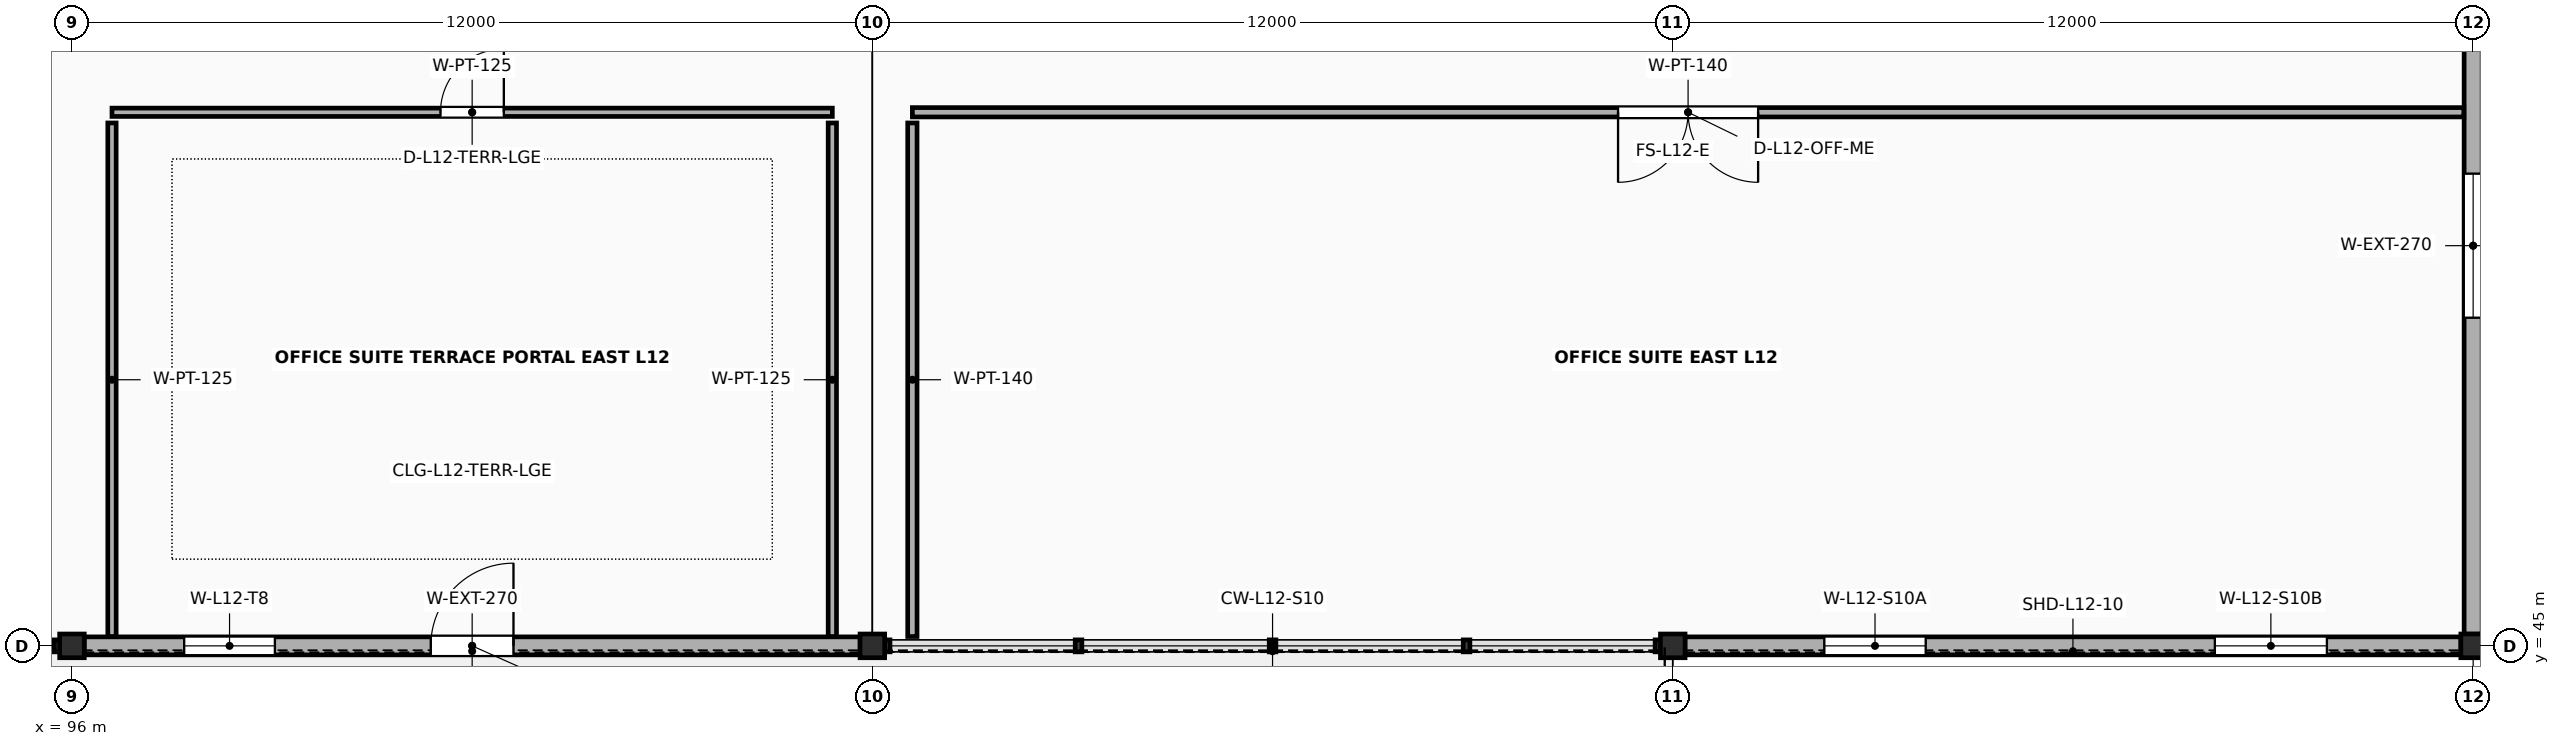
"""IFC4 building model, lengths in metres.
Left out: names, types, materials, properties, quantities, classifications, styles, units other than length and angle.
Written with IfcOpenShell. Run it as: python <this file> out.ifc"""

import sys

from ifc_helpers import new_model, si_unit, direction, frame, frame_2d, origin, origin_2d, place, context, subcontext, project, spatial, rectangle, i_section, extrude, element, fill, save


model = new_model("IFC4")
c1 = context("Model", 3, precision=1e-05, world=origin(), true_north=direction((0.0, 1.0)))
c2 = subcontext(c1, "Body", "Model", "MODEL_VIEW")
j1 = project(units=[si_unit("LENGTHUNIT", "METRE"), si_unit("PLANEANGLEUNIT", "RADIAN")], contexts=[c1])
p1 = place(None, origin())
s1 = spatial("IfcSite", under=j1, at=p1, CompositionType="ELEMENT")
p2 = place(p1, origin())
s2 = spatial("IfcBuilding", under=s1, at=p2, CompositionType="ELEMENT")
p3 = place(p2, frame((0.0, 0.0, 49.6)))
s3 = spatial("IfcBuildingStorey", under=s2, at=p3, CompositionType="ELEMENT", Elevation=49.6)
for number, where, z_axis, x_axis in (
    (1, (96.0, 45.0, 0.0), (0.0, 0.0, 1.0), (1.0, 0.0, 0.0)),
    (2, (108.0, 45.0, 0.0), (0.0, 0.0, 1.0), (1.0, 0.0, 0.0)),
    (3, (120.0, 45.0, 0.0), (0.0, 0.0, 1.0), (1.0, 0.0, 0.0)),
    (4, (132.0, 45.0, 0.0), (0.0, 0.0, 1.0), (1.0, 0.0, 0.0)),
):
    element("IfcColumn", number, at=place(p3, frame(where, z_axis=z_axis, x_axis=x_axis)), inside=s3, PredefinedType="COLUMN", context=c2, shape_type="SweptSolid", body=[
        extrude(i_section(OverallWidth=0.369, OverallDepth=0.356, WebThickness=0.011, FlangeThickness=0.018, FilletRadius=0.018, at=origin_2d()), origin(), (0.0, 0.0, 1.0), 4.0),
    ])
p4 = place(p3, frame((96.183, 45.0, 0.0), z_axis=(0.0, 0.0, 1.0), x_axis=(1.0, 0.0, 0.0)))
e5 = element("IfcWall", 5, at=p4, inside=s3, PredefinedType="SOLIDWALL", context=c2, shape_type="SweptSolid", body=[
    extrude(rectangle(XDim=11.635, YDim=0.27, at=frame_2d((5.817, 0.0))), origin(), (0.0, 0.0, 1.0), 3.301),
])
p5 = place(p4, frame((5.197, 0.0, 0.0)))
e6 = element("IfcOpeningElement", 6, at=p5, cuts=e5, PredefinedType="OPENING", context=c2, shape_type="SweptSolid", body=[
    extrude(rectangle(XDim=1.24, YDim=2.24, at=frame_2d((0.62, 1.12))), frame((0.0, 0.15, 0.0), z_axis=(0.0, -1.0, 0.0), x_axis=(1.0, 0.0, 0.0)), (0.0, 0.0, 1.0), 0.3),
])
p6 = place(p4, frame((1.5, 0.0, 0.85)))
e7 = element("IfcOpeningElement", 7, at=p6, cuts=e5, PredefinedType="OPENING", context=c2, shape_type="SweptSolid", body=[
    extrude(rectangle(XDim=1.36, YDim=1.42, at=frame_2d((0.68, 0.71))), frame((0.0, 0.15, 0.0), z_axis=(0.0, -1.0, 0.0), x_axis=(1.0, 0.0, 0.0)), (0.0, 0.0, 1.0), 0.3),
])
p7 = place(p3, frame((120.183, 45.0, 0.0), z_axis=(0.0, 0.0, 1.0), x_axis=(1.0, 0.0, 0.0)))
e8 = element("IfcWall", 8, at=p7, inside=s3, PredefinedType="SOLIDWALL", context=c2, shape_type="SweptSolid", body=[
    extrude(rectangle(XDim=11.635, YDim=0.27, at=frame_2d((5.817, 0.0))), origin(), (0.0, 0.0, 1.0), 3.301),
])
p8 = place(p7, frame((2.09, 0.0, 0.78)))
e9 = element("IfcOpeningElement", 9, at=p8, cuts=e8, PredefinedType="OPENING", context=c2, shape_type="SweptSolid", body=[
    extrude(rectangle(XDim=1.52, YDim=1.42, at=frame_2d((0.76, 0.71))), frame((0.0, 0.15, 0.0), z_axis=(0.0, -1.0, 0.0), x_axis=(1.0, 0.0, 0.0)), (0.0, 0.0, 1.0), 0.3),
])
p9 = place(p7, frame((7.945, 0.0, 0.78)))
e10 = element("IfcOpeningElement", 10, at=p9, cuts=e8, PredefinedType="OPENING", context=c2, shape_type="SweptSolid", body=[
    extrude(rectangle(XDim=1.68, YDim=1.42, at=frame_2d((0.84, 0.71))), frame((0.0, 0.15, 0.0), z_axis=(0.0, -1.0, 0.0), x_axis=(1.0, 0.0, 0.0)), (0.0, 0.0, 1.0), 0.3),
])
p10 = place(p3, frame((132.0, 45.176, 0.0), z_axis=(0.0, 0.0, 1.0), x_axis=(0.0, 1.0, 0.0)))
e11 = element("IfcWall", 11, at=p10, inside=s3, PredefinedType="SOLIDWALL", context=c2, shape_type="SweptSolid", body=[
    extrude(rectangle(XDim=11.648, YDim=0.27, at=frame_2d((5.824, 0.0))), origin(), (0.0, 0.0, 1.0), 3.301),
])
p11 = place(p10, frame((4.744, 0.0, 0.78)))
e12 = element("IfcOpeningElement", 12, at=p11, cuts=e11, PredefinedType="OPENING", context=c2, shape_type="SweptSolid", body=[
    extrude(rectangle(XDim=2.16, YDim=1.42, at=frame_2d((1.08, 0.71))), frame((0.0, 0.15, 0.0), z_axis=(0.0, -1.0, 0.0), x_axis=(1.0, 0.0, 0.0)), (0.0, 0.0, 1.0), 0.3),
])
p12 = place(p3, frame((96.6, 53.0, 0.0), z_axis=(0.0, 0.0, 1.0), x_axis=(1.0, 0.0, 0.0)))
e13 = element("IfcWall", 13, at=p12, inside=s3, PredefinedType="PARTITIONING", context=c2, shape_type="SweptSolid", body=[
    extrude(rectangle(XDim=10.8, YDim=0.125, at=frame_2d((5.4, 0.0))), origin(), (0.0, 0.0, 1.0), 2.88),
])
p13 = place(p12, frame((4.925, 0.0, 0.0)))
e14 = element("IfcOpeningElement", 14, at=p13, cuts=e13, PredefinedType="OPENING", context=c2, shape_type="SweptSolid", body=[
    extrude(rectangle(XDim=0.95, YDim=2.13, at=frame_2d((0.475, 1.065))), frame((0.0, 0.077, 0.0), z_axis=(0.0, -1.0, 0.0), x_axis=(1.0, 0.0, 0.0)), (0.0, 0.0, 1.0), 0.155),
])
for number, where, z_axis, x_axis in (
    (15, (96.6, 45.14, 0.0), (0.0, 0.0, 1.0), (0.0, 1.0, 0.0)),
    (16, (107.4, 45.14, 0.0), (0.0, 0.0, 1.0), (0.0, 1.0, 0.0)),
):
    element("IfcWall", number, at=place(p3, frame(where, z_axis=z_axis, x_axis=x_axis)), inside=s3, PredefinedType="PARTITIONING", context=c2, shape_type="SweptSolid", body=[
        extrude(rectangle(XDim=7.7, YDim=0.125, at=frame_2d((3.85, 0.0))), origin(), (0.0, 0.0, 1.0), 2.88),
    ])
p14 = place(p3, frame((108.6, 53.0, 0.0), z_axis=(0.0, 0.0, 1.0), x_axis=(1.0, 0.0, 0.0)))
e17 = element("IfcWall", 17, at=p14, inside=s3, PredefinedType="PARTITIONING", context=c2, shape_type="SweptSolid", body=[
    extrude(rectangle(XDim=23.26, YDim=0.14, at=frame_2d((11.63, 0.0))), origin(), (0.0, 0.0, 1.0), 2.88),
])
p15 = place(p14, frame((10.58, 0.0, 0.0)))
e18 = element("IfcOpeningElement", 18, at=p15, cuts=e17, PredefinedType="OPENING", context=c2, shape_type="SweptSolid", body=[
    extrude(rectangle(XDim=2.1, YDim=2.47, at=frame_2d((1.05, 1.235))), frame((0.0, 0.085, 0.0), z_axis=(0.0, -1.0, 0.0), x_axis=(1.0, 0.0, 0.0)), (0.0, 0.0, 1.0), 0.17),
])
p16 = place(p3, frame((108.6, 45.14, 0.0), z_axis=(0.0, 0.0, 1.0), x_axis=(0.0, 1.0, 0.0)))
e19 = element("IfcWall", 19, at=p16, inside=s3, PredefinedType="PARTITIONING", context=c2, shape_type="SweptSolid", body=[
    extrude(rectangle(XDim=7.7, YDim=0.14, at=frame_2d((3.85, 0.0))), origin(), (0.0, 0.0, 1.0), 2.88),
])
p17 = place(p5, origin())
e20 = element("IfcDoor", 20, at=p17, inside=s3, OperationType="SINGLE_SWING_RIGHT", PredefinedType="DOOR", context=c2, shape_type="SweptSolid", body=[
    extrude(rectangle(XDim=1.24, YDim=2.24, at=frame_2d((0.62, 1.12))), frame((0.0, 0.025, 0.0), z_axis=(0.0, -1.0, 0.0), x_axis=(1.0, 0.0, 0.0)), (0.0, 0.0, 1.0), 0.05),
])
fill(e6, e20)
p18 = place(p6, origin())
e21 = element("IfcWindow", 21, at=p18, inside=s3, PartitioningType="SINGLE_PANEL", PredefinedType="WINDOW", context=c2, shape_type="SweptSolid", body=[
    extrude(rectangle(XDim=1.36, YDim=1.42, at=frame_2d((0.68, 0.71))), frame((0.0, 0.03, 0.0), z_axis=(0.0, -1.0, 0.0), x_axis=(1.0, 0.0, 0.0)), (0.0, 0.0, 1.0), 0.06),
])
fill(e7, e21)
p19 = place(p8, origin())
e22 = element("IfcWindow", 22, at=p19, inside=s3, PartitioningType="SINGLE_PANEL", PredefinedType="WINDOW", context=c2, shape_type="SweptSolid", body=[
    extrude(rectangle(XDim=1.52, YDim=1.42, at=frame_2d((0.76, 0.71))), frame((0.0, 0.03, 0.0), z_axis=(0.0, -1.0, 0.0), x_axis=(1.0, 0.0, 0.0)), (0.0, 0.0, 1.0), 0.06),
])
fill(e9, e22)
p20 = place(p9, origin())
e23 = element("IfcWindow", 23, at=p20, inside=s3, PartitioningType="SINGLE_PANEL", PredefinedType="WINDOW", context=c2, shape_type="SweptSolid", body=[
    extrude(rectangle(XDim=1.68, YDim=1.42, at=frame_2d((0.84, 0.71))), frame((0.0, 0.03, 0.0), z_axis=(0.0, -1.0, 0.0), x_axis=(1.0, 0.0, 0.0)), (0.0, 0.0, 1.0), 0.06),
])
fill(e10, e23)
p21 = place(p11, origin())
e24 = element("IfcWindow", 24, at=p21, inside=s3, PartitioningType="DOUBLE_PANEL_VERTICAL", PredefinedType="WINDOW", context=c2, shape_type="SweptSolid", body=[
    extrude(rectangle(XDim=2.16, YDim=1.42, at=frame_2d((1.08, 0.71))), frame((0.0, 0.03, 0.0), z_axis=(0.0, -1.0, 0.0), x_axis=(1.0, 0.0, 0.0)), (0.0, 0.0, 1.0), 0.06),
])
fill(e12, e24)
p22 = place(p13, origin())
e25 = element("IfcDoor", 25, at=p22, inside=s3, OperationType="SINGLE_SWING_RIGHT", PredefinedType="DOOR", context=c2, shape_type="SweptSolid", body=[
    extrude(rectangle(XDim=0.95, YDim=2.13, at=frame_2d((0.475, 1.065))), frame((0.0, 0.025, 0.0), z_axis=(0.0, -1.0, 0.0), x_axis=(1.0, 0.0, 0.0)), (0.0, 0.0, 1.0), 0.05),
])
fill(e14, e25)
p23 = place(p15, origin())
e26 = element("IfcDoor", 26, at=p23, inside=s3, OperationType="DOUBLE_DOOR_SINGLE_SWING", PredefinedType="DOOR", context=c2, shape_type="SweptSolid", body=[
    extrude(rectangle(XDim=2.1, YDim=2.47, at=frame_2d((1.05, 1.235))), frame((0.0, 0.025, 0.0), z_axis=(0.0, -1.0, 0.0), x_axis=(1.0, 0.0, 0.0)), (0.0, 0.0, 1.0), 0.05),
])
fill(e18, e26)
save(model, sys.argv[1])
